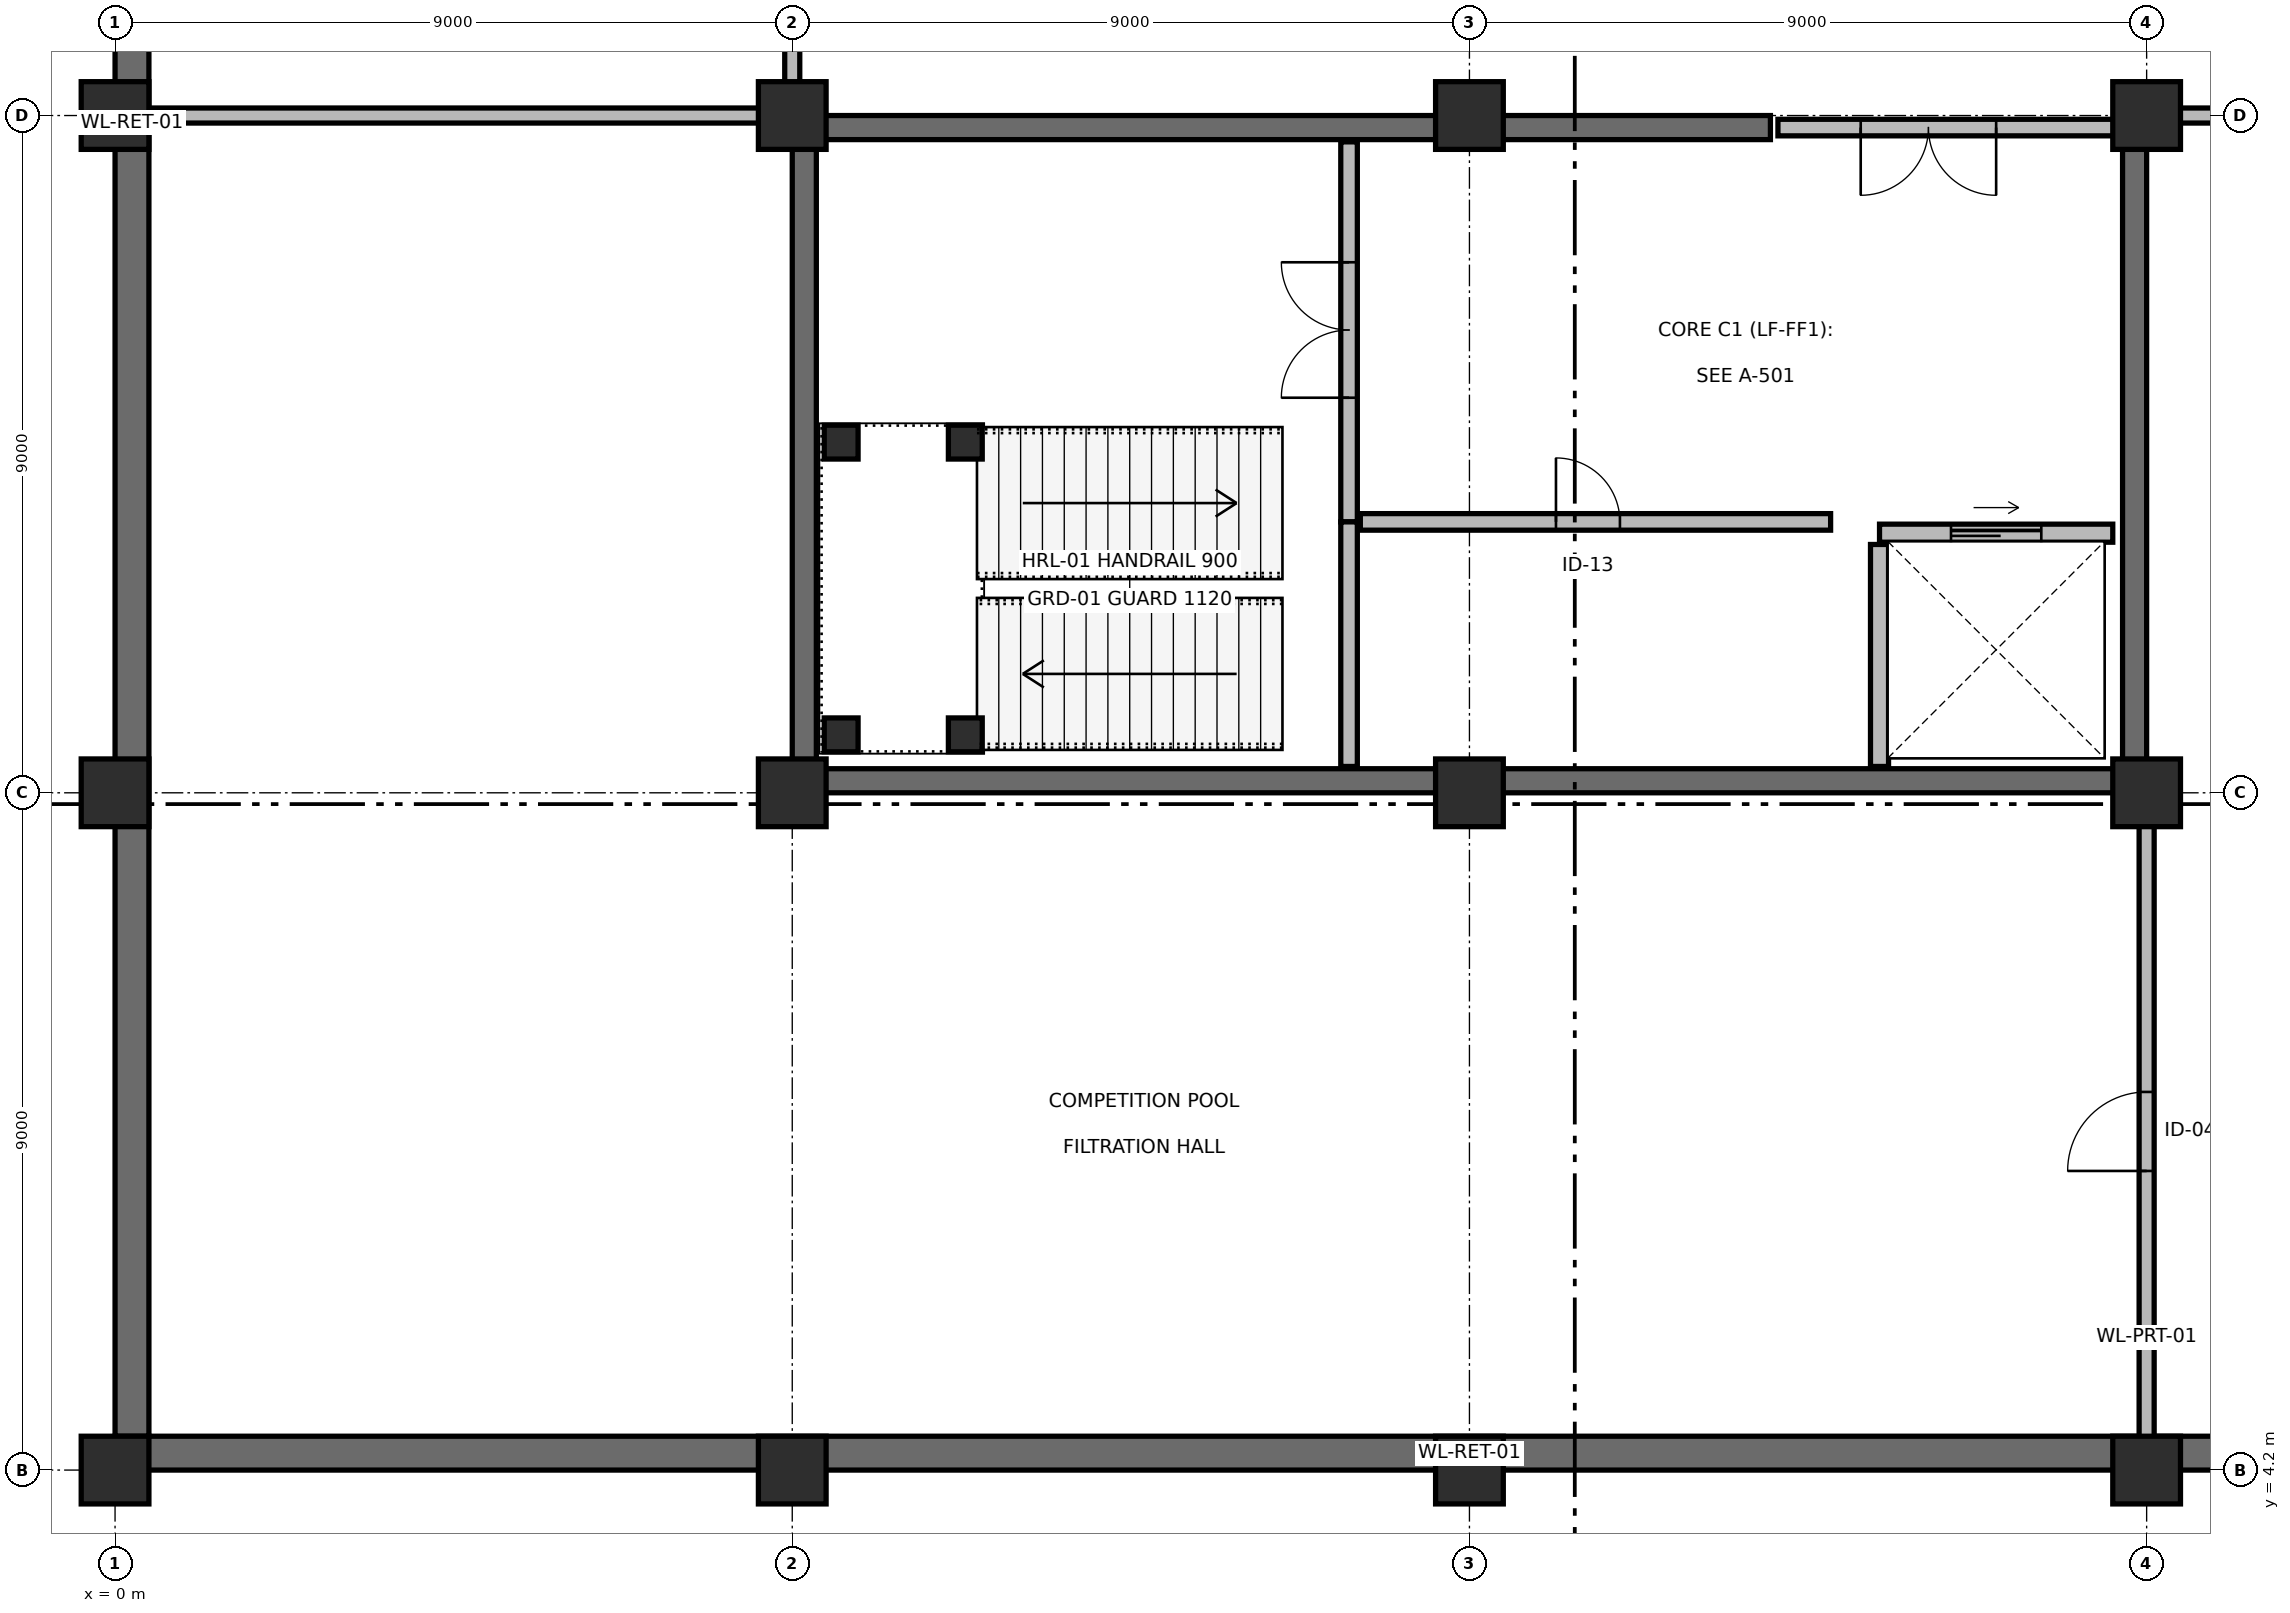
"""IFC4 building model, lengths in metres.
Left out: names, types, materials, properties, quantities, classifications, styles, units other than length and angle.
Written with IfcOpenShell. Run it as: python <this file> out.ifc"""

import sys

from ifc_helpers import new_model, si_unit, direction, frame, frame_2d, origin, origin_2d, place, context, subcontext, project, spatial, rectangle, extrude, element, fill, save


model = new_model("IFC4")
c1 = context("Model", 3, precision=1e-05, world=origin(), true_north=direction((0.0, 1.0)))
c2 = subcontext(c1, "Body", "Model", "MODEL_VIEW")
j1 = project(units=[si_unit("LENGTHUNIT", "METRE"), si_unit("PLANEANGLEUNIT", "RADIAN")], contexts=[c1])
p1 = place(None, origin())
s1 = spatial("IfcSite", under=j1, at=p1, CompositionType="ELEMENT")
p2 = place(p1, origin())
s2 = spatial("IfcBuilding", under=s1, at=p2, CompositionType="ELEMENT")
p3 = place(p2, frame((0.0, 0.0, -4.8)))
s3 = spatial("IfcBuildingStorey", under=s2, at=p3, CompositionType="ELEMENT", Elevation=-4.8)
for number, where, z_axis, x_axis in (
    (1, (0.0, 4.2, 0.0), (0.0, 0.0, 1.0), (1.0, 0.0, 0.0)),
    (2, (0.0, 13.2, 0.0), (0.0, 0.0, 1.0), (1.0, 0.0, 0.0)),
    (3, (0.0, 22.2, 0.0), (0.0, 0.0, 1.0), (1.0, 0.0, 0.0)),
    (4, (9.0, 4.2, 0.0), (0.0, 0.0, 1.0), (1.0, 0.0, 0.0)),
    (5, (9.0, 13.2, 0.0), (0.0, 0.0, 1.0), (1.0, 0.0, 0.0)),
    (6, (9.0, 22.2, 0.0), (0.0, 0.0, 1.0), (1.0, 0.0, 0.0)),
    (7, (18.0, 4.2, 0.0), (0.0, 0.0, 1.0), (1.0, 0.0, 0.0)),
    (8, (18.0, 13.2, 0.0), (0.0, 0.0, 1.0), (1.0, 0.0, 0.0)),
    (9, (18.0, 22.2, 0.0), (0.0, 0.0, 1.0), (1.0, 0.0, 0.0)),
    (10, (27.0, 4.2, 0.0), (0.0, 0.0, 1.0), (1.0, 0.0, 0.0)),
    (11, (27.0, 13.2, 0.0), (0.0, 0.0, 1.0), (1.0, 0.0, 0.0)),
    (12, (27.0, 22.2, 0.0), (0.0, 0.0, 1.0), (1.0, 0.0, 0.0)),
):
    element("IfcColumn", number, at=place(p3, frame(where, z_axis=z_axis, x_axis=x_axis)), inside=s3, PredefinedType="COLUMN", context=c2, shape_type="SweptSolid", body=[
        extrude(rectangle(XDim=0.9, YDim=0.9, at=origin_2d()), origin(), (0.0, 0.0, 1.0), 4.8),
    ])
p4 = place(p3, frame((0.0, 4.425, 0.0), z_axis=(0.0, 0.0, 1.0), x_axis=(1.0, 0.0, 0.0)))
e13 = element("IfcWall", 13, at=p4, inside=s3, PredefinedType="USERDEFINED", context=c2, shape_type="SweptSolid", body=[
    extrude(rectangle(XDim=36.0, YDim=0.45, at=frame_2d((18.0, 0.0))), origin(), (0.0, 0.0, 1.0), 4.5),
])
p5 = place(p3, frame((0.225, 4.65, 0.0), z_axis=(0.0, 0.0, 1.0), x_axis=(0.0, 1.0, 0.0)))
e14 = element("IfcWall", 14, at=p5, inside=s3, PredefinedType="USERDEFINED", context=c2, shape_type="SweptSolid", body=[
    extrude(rectangle(XDim=110.1, YDim=0.45, at=frame_2d((55.05, 0.0))), origin(), (0.0, 0.0, 1.0), 4.5),
])
p6 = place(p3, frame((9.0, 13.36, 0.0), z_axis=(0.0, 0.0, 1.0), x_axis=(1.0, 0.0, 0.0)))
e15 = element("IfcWall", 15, at=p6, inside=s3, PredefinedType="SHEAR", context=c2, shape_type="SweptSolid", body=[
    extrude(rectangle(XDim=18.0, YDim=0.32, at=frame_2d((9.0, 0.0))), origin(), (0.0, 0.0, 1.0), 4.8),
])
p7 = place(p3, frame((9.0, 22.04, 0.0), z_axis=(0.0, 0.0, 1.0), x_axis=(1.0, 0.0, 0.0)))
e16 = element("IfcWall", 16, at=p7, inside=s3, PredefinedType="SHEAR", context=c2, shape_type="SweptSolid", body=[
    extrude(rectangle(XDim=13.0, YDim=0.32, at=frame_2d((6.5, 0.0))), origin(), (0.0, 0.0, 1.0), 4.8),
])
p8 = place(p3, frame((9.16, 13.52, 0.0), z_axis=(0.0, 0.0, 1.0), x_axis=(0.0, 1.0, 0.0)))
e17 = element("IfcWall", 17, at=p8, inside=s3, PredefinedType="SHEAR", context=c2, shape_type="SweptSolid", body=[
    extrude(rectangle(XDim=8.36, YDim=0.32, at=frame_2d((4.18, 0.0))), origin(), (0.0, 0.0, 1.0), 4.8),
])
p9 = place(p3, frame((26.84, 13.52, 0.0), z_axis=(0.0, 0.0, 1.0), x_axis=(0.0, 1.0, 0.0)))
e18 = element("IfcWall", 18, at=p9, inside=s3, PredefinedType="SHEAR", context=c2, shape_type="SweptSolid", body=[
    extrude(rectangle(XDim=8.48, YDim=0.32, at=frame_2d((4.24, 0.0))), origin(), (0.0, 0.0, 1.0), 4.8),
])
p10 = place(p3, frame((16.4, 21.85, 0.0), z_axis=(0.0, 0.0, 1.0), x_axis=(0.0, -1.0, 0.0)))
e19 = element("IfcWall", 19, at=p10, inside=s3, PredefinedType="PARTITIONING", context=c2, shape_type="SweptSolid", body=[
    extrude(rectangle(XDim=5.05, YDim=0.22, at=frame_2d((2.525, 0.0))), origin(), (0.0, 0.0, 1.0), 3.835),
])
p11 = place(p10, frame((1.6, 0.0, 0.0)))
e20 = element("IfcOpeningElement", 20, at=p11, cuts=e19, PredefinedType="OPENING", context=c2, shape_type="SweptSolid", body=[
    extrude(rectangle(XDim=1.8, YDim=2.2, at=frame_2d((0.9, 1.1))), frame((0.0, 0.12, 0.0), z_axis=(0.0, -1.0, 0.0), x_axis=(1.0, 0.0, 0.0)), (0.0, 0.0, 1.0), 0.24),
])
p12 = place(p3, frame((16.4, 13.55, 0.0), z_axis=(0.0, 0.0, 1.0), x_axis=(0.0, 1.0, 0.0)))
e21 = element("IfcWall", 21, at=p12, inside=s3, PredefinedType="PARTITIONING", context=c2, shape_type="SweptSolid", body=[
    extrude(rectangle(XDim=3.25, YDim=0.22, at=frame_2d((1.625, 0.0))), origin(), (0.0, 0.0, 1.0), 3.835),
])
p13 = place(p3, frame((16.55, 16.8, 0.0), z_axis=(0.0, 0.0, 1.0), x_axis=(1.0, 0.0, 0.0)))
e22 = element("IfcWall", 22, at=p13, inside=s3, PredefinedType="PARTITIONING", context=c2, shape_type="SweptSolid", body=[
    extrude(rectangle(XDim=6.25, YDim=0.22, at=frame_2d((3.125, 0.0))), origin(), (0.0, 0.0, 1.0), 3.885),
])
p14 = place(p13, frame((2.6, 0.0, 0.0)))
e23 = element("IfcOpeningElement", 23, at=p14, cuts=e22, PredefinedType="OPENING", context=c2, shape_type="SweptSolid", body=[
    extrude(rectangle(XDim=0.85, YDim=2.05, at=frame_2d((0.425, 1.025))), frame((0.0, 0.12, 0.0), z_axis=(0.0, -1.0, 0.0), x_axis=(1.0, 0.0, 0.0)), (0.0, 0.0, 1.0), 0.24),
])
p15 = place(p3, frame((23.45, 16.65, 0.0), z_axis=(0.0, 0.0, 1.0), x_axis=(1.0, 0.0, 0.0)))
e24 = element("IfcWall", 24, at=p15, inside=s3, PredefinedType="SOLIDWALL", context=c2, shape_type="SweptSolid", body=[
    extrude(rectangle(XDim=3.1, YDim=0.24, at=frame_2d((1.55, 0.0))), origin(), (0.0, 0.0, 1.0), 4.505),
])
p16 = place(p15, frame((0.95, 0.0, 0.0)))
e25 = element("IfcOpeningElement", 25, at=p16, cuts=e24, PredefinedType="OPENING", context=c2, shape_type="SweptSolid", body=[
    extrude(rectangle(XDim=1.2, YDim=2.2, at=frame_2d((0.6, 1.1))), frame((0.0, 0.13, 0.0), z_axis=(0.0, -1.0, 0.0), x_axis=(1.0, 0.0, 0.0)), (0.0, 0.0, 1.0), 0.26),
])
p17 = place(p3, frame((23.45, 13.55, 0.0), z_axis=(0.0, 0.0, 1.0), x_axis=(0.0, 1.0, 0.0)))
e26 = element("IfcWall", 26, at=p17, inside=s3, PredefinedType="SOLIDWALL", context=c2, shape_type="SweptSolid", body=[
    extrude(rectangle(XDim=2.95, YDim=0.24, at=frame_2d((1.475, 0.0))), origin(), (0.0, 0.0, 1.0), 3.835),
])
p18 = place(p3, frame((22.1, 22.04, 0.0), z_axis=(0.0, 0.0, 1.0), x_axis=(1.0, 0.0, 0.0)))
e27 = element("IfcWall", 27, at=p18, inside=s3, PredefinedType="PARTITIONING", context=c2, shape_type="SweptSolid", body=[
    extrude(rectangle(XDim=4.5, YDim=0.22, at=frame_2d((2.25, 0.0))), origin(), (0.0, 0.0, 1.0), 3.835),
])
p19 = place(p18, frame((1.1, 0.0, 0.0)))
e28 = element("IfcOpeningElement", 28, at=p19, cuts=e27, PredefinedType="OPENING", context=c2, shape_type="SweptSolid", body=[
    extrude(rectangle(XDim=1.8, YDim=2.2, at=frame_2d((0.9, 1.1))), frame((0.0, 0.12, 0.0), z_axis=(0.0, -1.0, 0.0), x_axis=(1.0, 0.0, 0.0)), (0.0, 0.0, 1.0), 0.24),
])
p20 = place(p3, frame((27.0, 4.2, 0.0), z_axis=(0.0, 0.0, 1.0), x_axis=(0.0, 1.0, 0.0)))
e29 = element("IfcWall", 29, at=p20, inside=s3, PredefinedType="PARTITIONING", context=c2, shape_type="SweptSolid", body=[
    extrude(rectangle(XDim=9.0, YDim=0.2, at=frame_2d((4.5, 0.0))), origin(), (0.0, 0.0, 1.0), 3.885),
])
p21 = place(p20, frame((3.975, 0.0, 0.0)))
e30 = element("IfcOpeningElement", 30, at=p21, cuts=e29, PredefinedType="OPENING", context=c2, shape_type="SweptSolid", body=[
    extrude(rectangle(XDim=1.05, YDim=2.15, at=frame_2d((0.525, 1.075))), frame((0.0, 0.11, 0.0), z_axis=(0.0, -1.0, 0.0), x_axis=(1.0, 0.0, 0.0)), (0.0, 0.0, 1.0), 0.22),
])
p22 = place(p3, frame((27.0, 22.2, 0.0), z_axis=(0.0, 0.0, 1.0), x_axis=(1.0, 0.0, 0.0)))
e31 = element("IfcWall", 31, at=p22, inside=s3, PredefinedType="PARTITIONING", context=c2, shape_type="SweptSolid", body=[
    extrude(rectangle(XDim=9.0, YDim=0.2, at=frame_2d((4.5, 0.0))), origin(), (0.0, 0.0, 1.0), 3.835),
])
p23 = place(p22, frame((3.925, 0.0, 0.0)))
e32 = element("IfcOpeningElement", 32, at=p23, cuts=e31, PredefinedType="OPENING", context=c2, shape_type="SweptSolid", body=[
    extrude(rectangle(XDim=1.15, YDim=2.2, at=frame_2d((0.575, 1.1))), frame((0.0, 0.11, 0.0), z_axis=(0.0, -1.0, 0.0), x_axis=(1.0, 0.0, 0.0)), (0.0, 0.0, 1.0), 0.22),
])
p24 = place(p3, frame((9.0, 22.2, 0.0), z_axis=(0.0, 0.0, 1.0), x_axis=(0.0, 1.0, 0.0)))
e33 = element("IfcWall", 33, at=p24, inside=s3, PredefinedType="PARTITIONING", context=c2, shape_type="SweptSolid", body=[
    extrude(rectangle(XDim=19.8, YDim=0.2, at=frame_2d((9.9, 0.0))), origin(), (0.0, 0.0, 1.0), 3.735),
])
p25 = place(p24, frame((11.701, 0.0, 0.0)))
e34 = element("IfcOpeningElement", 34, at=p25, cuts=e33, PredefinedType="OPENING", context=c2, shape_type="SweptSolid", body=[
    extrude(rectangle(XDim=1.15, YDim=2.2, at=frame_2d((0.575, 1.1))), frame((0.0, 0.11, 0.0), z_axis=(0.0, -1.0, 0.0), x_axis=(1.0, 0.0, 0.0)), (0.0, 0.0, 1.0), 0.22),
])
p26 = place(p3, frame((0.0, 22.2, 0.0), z_axis=(0.0, 0.0, 1.0), x_axis=(1.0, 0.0, 0.0)))
e35 = element("IfcWall", 35, at=p26, inside=s3, PredefinedType="PARTITIONING", context=c2, shape_type="SweptSolid", body=[
    extrude(rectangle(XDim=9.0, YDim=0.2, at=frame_2d((4.5, 0.0))), origin(), (0.0, 0.0, 1.0), 3.835),
])
for number, where, z_axis, x_axis in (
    (36, (9.65, 13.97, 0.0), (0.0, 0.0, 1.0), (1.0, 0.0, 0.0)),
    (37, (11.3, 13.97, 0.0), (0.0, 0.0, 1.0), (1.0, 0.0, 0.0)),
    (38, (9.65, 17.86, 0.0), (0.0, 0.0, 1.0), (1.0, 0.0, 0.0)),
    (39, (11.3, 17.86, 0.0), (0.0, 0.0, 1.0), (1.0, 0.0, 0.0)),
):
    element("IfcColumn", number, at=place(p3, frame(where, z_axis=z_axis, x_axis=x_axis)), inside=s3, PredefinedType="COLUMN", context=c2, shape_type="SweptSolid", body=[
        extrude(rectangle(XDim=0.45, YDim=0.45, at=origin_2d()), origin(), (0.0, 0.0, 1.0), 4.8),
    ])
p27 = place(p11, origin())
e40 = element("IfcDoor", 40, at=p27, inside=s3, OperationType="DOUBLE_DOOR_SINGLE_SWING", PredefinedType="DOOR", context=c2, shape_type="SweptSolid", body=[
    extrude(rectangle(XDim=1.8, YDim=2.2, at=frame_2d((0.9, 1.1))), frame((0.0, 0.025, 0.0), z_axis=(0.0, -1.0, 0.0), x_axis=(1.0, 0.0, 0.0)), (0.0, 0.0, 1.0), 0.05),
])
fill(e20, e40)
p28 = place(p14, origin())
e41 = element("IfcDoor", 41, at=p28, inside=s3, OperationType="SINGLE_SWING_LEFT", PredefinedType="DOOR", context=c2, shape_type="SweptSolid", body=[
    extrude(rectangle(XDim=0.85, YDim=2.05, at=frame_2d((0.425, 1.025))), frame((0.0, 0.025, 0.0), z_axis=(0.0, -1.0, 0.0), x_axis=(1.0, 0.0, 0.0)), (0.0, 0.0, 1.0), 0.05),
])
fill(e23, e41)
p29 = place(p16, origin())
e42 = element("IfcDoor", 42, at=p29, inside=s3, OperationType="DOUBLE_DOOR_SLIDING", PredefinedType="DOOR", context=c2, shape_type="SweptSolid", body=[
    extrude(rectangle(XDim=1.2, YDim=2.2, at=frame_2d((0.6, 1.1))), frame((0.0, 0.025, 0.0), z_axis=(0.0, -1.0, 0.0), x_axis=(1.0, 0.0, 0.0)), (0.0, 0.0, 1.0), 0.05),
])
fill(e25, e42)
p30 = place(p19, origin())
e43 = element("IfcDoor", 43, at=p30, inside=s3, OperationType="DOUBLE_DOOR_SINGLE_SWING", PredefinedType="DOOR", context=c2, shape_type="SweptSolid", body=[
    extrude(rectangle(XDim=1.8, YDim=2.2, at=frame_2d((0.9, 1.1))), frame((0.0, 0.025, 0.0), z_axis=(0.0, -1.0, 0.0), x_axis=(1.0, 0.0, 0.0)), (0.0, 0.0, 1.0), 0.05),
])
fill(e28, e43)
p31 = place(p21, origin())
e44 = element("IfcDoor", 44, at=p31, inside=s3, OperationType="SINGLE_SWING_LEFT", PredefinedType="DOOR", context=c2, shape_type="SweptSolid", body=[
    extrude(rectangle(XDim=1.05, YDim=2.15, at=frame_2d((0.525, 1.075))), frame((0.0, 0.025, 0.0), z_axis=(0.0, -1.0, 0.0), x_axis=(1.0, 0.0, 0.0)), (0.0, 0.0, 1.0), 0.05),
])
fill(e30, e44)
save(model, sys.argv[1])
